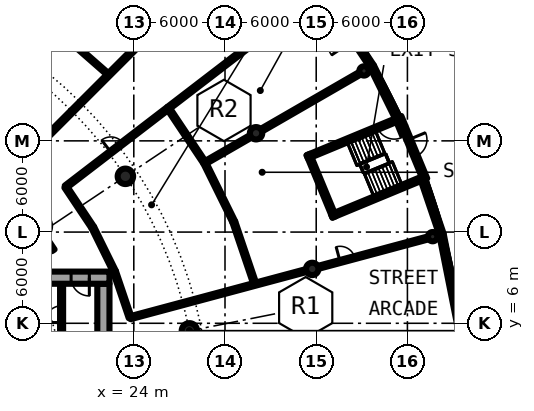
"""IFC4 building model, lengths in metres.
Left out: names, types, materials, properties, quantities, classifications, styles, units other than length and angle.
Written with IfcOpenShell. Run it as: python <this file> out.ifc"""

import sys

from ifc_helpers import new_model, si_unit, direction, frame, frame_2d, origin, origin_2d, place, context, subcontext, project, spatial, rectangle, hollow_circle, extrude, element, fill, save


model = new_model("IFC4")
c1 = context("Model", 3, precision=1e-05, world=origin(), true_north=direction((0.0, 1.0)))
c2 = subcontext(c1, "Body", "Model", "MODEL_VIEW")
j1 = project(units=[si_unit("LENGTHUNIT", "METRE"), si_unit("PLANEANGLEUNIT", "RADIAN")], contexts=[c1])
p1 = place(None, origin())
s1 = spatial("IfcSite", under=j1, at=p1, CompositionType="ELEMENT")
p2 = place(p1, origin())
s2 = spatial("IfcBuilding", under=s1, at=p2, CompositionType="ELEMENT")
p3 = place(p2, origin())
s3 = spatial("IfcBuildingStorey", under=s2, at=p3, CompositionType="ELEMENT", Elevation=0.0)
for number, where, z_axis, x_axis in (
    (1, (27.658, 5.501, -0.5), (0.0, 0.0, 1.0), (1.0, 0.0, 0.0)),
    (2, (23.448, 15.667, -0.5), (0.0, 0.0, 1.0), (1.0, 0.0, 0.0)),
):
    element("IfcColumn", number, at=place(p3, frame(where, z_axis=z_axis, x_axis=x_axis)), inside=s3, PredefinedType="COLUMN", context=c2, shape_type="SweptSolid", body=[
        extrude(hollow_circle(Radius=0.508, WallThickness=0.05, at=origin_2d()), origin(), (0.0, 0.0, 1.0), 5.9),
    ])
for number, where, z_axis, x_axis in (
    (3, (35.739, 9.576, -0.5), (0.0, 0.0, 1.0), (1.0, 0.0, 0.0)),
    (4, (32.043, 18.5, -0.5), (0.0, 0.0, 1.0), (1.0, 0.0, 0.0)),
):
    element("IfcColumn", number, at=place(p3, frame(where, z_axis=z_axis, x_axis=x_axis)), inside=s3, PredefinedType="COLUMN", context=c2, shape_type="SweptSolid", body=[
        extrude(hollow_circle(Radius=0.406, WallThickness=0.03, at=origin_2d()), origin(), (0.0, 0.0, 1.0), 5.9),
    ])
for number, where, z_axis, x_axis in (
    (5, (43.66, 11.698, -0.5), (0.0, 0.0, 1.0), (1.0, 0.0, 0.0)),
    (6, (39.144, 22.6, -0.5), (0.0, 0.0, 1.0), (1.0, 0.0, 0.0)),
):
    element("IfcColumn", number, at=place(p3, frame(where, z_axis=z_axis, x_axis=x_axis)), inside=s3, PredefinedType="COLUMN", context=c2, shape_type="SweptSolid", body=[
        extrude(hollow_circle(Radius=0.305, WallThickness=0.025, at=origin_2d()), origin(), (0.0, 0.0, 1.0), 5.9),
    ])
p4 = place(p3, frame((45.408, 5.978, 0.0), z_axis=(0.0, 0.0, 1.0), x_axis=(-0.195112945602, 0.980780780021, 0.0)))
e7 = element("IfcWall", 7, at=p4, inside=s3, PredefinedType="SOLIDWALL", context=c2, shape_type="SweptSolid", body=[
    extrude(rectangle(XDim=5.991, YDim=0.3, at=frame_2d((2.996, 0.0))), origin(), (0.0, 0.0, 1.0), 4.95),
])
p5 = place(p4, frame((1.396, 0.0, 0.3)))
e8 = element("IfcOpeningElement", 8, at=p5, cuts=e7, PredefinedType="OPENING", context=c2, shape_type="SweptSolid", body=[
    extrude(rectangle(XDim=3.2, YDim=3.6, at=frame_2d((1.6, 1.8))), frame((0.0, 0.16, 0.0), z_axis=(0.0, -1.0, 0.0), x_axis=(1.0, 0.0, 0.0)), (0.0, 0.0, 1.0), 0.32),
])
p6 = place(p3, frame((44.239, 11.854, 0.0), z_axis=(0.0, 0.0, 1.0), x_axis=(-0.321481387979, 0.946915897629, 0.0)))
e9 = element("IfcWall", 9, at=p6, inside=s3, PredefinedType="SOLIDWALL", context=c2, shape_type="SweptSolid", body=[
    extrude(rectangle(XDim=3.761, YDim=0.3, at=frame_2d((1.88, 0.0))), origin(), (0.0, 0.0, 1.0), 4.95),
])
p7 = place(p3, frame((41.327, 19.527, 0.0), z_axis=(0.0, 0.0, 1.0), x_axis=(-0.44219447383, 0.896919197762, 0.0)))
e10 = element("IfcWall", 10, at=p7, inside=s3, PredefinedType="SOLIDWALL", context=c2, shape_type="SweptSolid", body=[
    extrude(rectangle(XDim=3.76, YDim=0.3, at=frame_2d((1.88, 0.0))), origin(), (0.0, 0.0, 1.0), 4.95),
])
p8 = place(p3, frame((39.664, 22.9, 0.0), z_axis=(0.0, 0.0, 1.0), x_axis=(-0.55554631985, 0.831485590074, 0.0)))
e11 = element("IfcWall", 11, at=p8, inside=s3, PredefinedType="SOLIDWALL", context=c2, shape_type="SweptSolid", body=[
    extrude(rectangle(XDim=5.991, YDim=0.3, at=frame_2d((2.995, 0.0))), origin(), (0.0, 0.0, 1.0), 4.95),
])
p9 = place(p8, frame((2.095, 0.0, 0.0)))
e12 = element("IfcOpeningElement", 12, at=p9, cuts=e11, PredefinedType="OPENING", context=c2, shape_type="SweptSolid", body=[
    extrude(rectangle(XDim=1.8, YDim=2.2, at=frame_2d((0.9, 1.1))), frame((0.0, 0.16, 0.0), z_axis=(0.0, -1.0, 0.0), x_axis=(1.0, 0.0, 0.0)), (0.0, 0.0, 1.0), 0.32),
])
p10 = place(p3, frame((22.0, 8.6, 0.0), z_axis=(0.0, 0.0, 1.0), x_axis=(0.0, -1.0, 0.0)))
e13 = element("IfcWall", 13, at=p10, inside=s3, PredefinedType="SHEAR", context=c2, shape_type="SweptSolid", body=[
    extrude(rectangle(XDim=17.2, YDim=0.8, at=frame_2d((8.6, 0.0))), origin(), (0.0, 0.0, 1.0), 5.4),
])
p11 = place(p10, frame((7.7, 0.0, 0.0)))
e14 = element("IfcOpeningElement", 14, at=p11, cuts=e13, PredefinedType="OPENING", context=c2, shape_type="SweptSolid", body=[
    extrude(rectangle(XDim=1.8, YDim=2.3, at=frame_2d((0.9, 1.15))), frame((0.0, 0.41, 0.0), z_axis=(0.0, -1.0, 0.0), x_axis=(1.0, 0.0, 0.0)), (0.0, 0.0, 1.0), 0.82),
])
p12 = place(p3, frame((19.25, 1.575, 0.0), z_axis=(0.0, 0.0, 1.0), x_axis=(0.0, 1.0, 0.0)))
e15 = element("IfcWall", 15, at=p12, inside=s3, PredefinedType="SOLIDWALL", context=c2, shape_type="SweptSolid", body=[
    extrude(rectangle(XDim=7.025, YDim=0.2, at=frame_2d((3.513, 0.0))), origin(), (0.0, 0.0, 1.0), 4.95),
])
p13 = place(p12, frame((4.475, 0.0, 0.0)))
e16 = element("IfcOpeningElement", 16, at=p13, cuts=e15, PredefinedType="OPENING", context=c2, shape_type="SweptSolid", body=[
    extrude(rectangle(XDim=1.1, YDim=2.3, at=frame_2d((0.55, 1.15))), frame((0.0, 0.11, 0.0), z_axis=(0.0, -1.0, 0.0), x_axis=(1.0, 0.0, 0.0)), (0.0, 0.0, 1.0), 0.22),
])
p14 = place(p3, frame((22.4, 9.0, 0.0), z_axis=(0.0, 0.0, 1.0), x_axis=(-1.0, 0.0, 0.0)))
e17 = element("IfcWall", 17, at=p14, inside=s3, PredefinedType="SHEAR", context=c2, shape_type="SweptSolid", body=[
    extrude(rectangle(XDim=5.4, YDim=0.8, at=frame_2d((2.7, 0.0))), origin(), (0.0, 0.0, 1.0), 5.4),
])
p15 = place(p14, frame((1.325, 0.0, 0.0)))
e18 = element("IfcOpeningElement", 18, at=p15, cuts=e17, PredefinedType="OPENING", context=c2, shape_type="SweptSolid", body=[
    extrude(rectangle(XDim=1.2, YDim=2.3, at=frame_2d((0.6, 1.15))), frame((0.0, 0.41, 0.0), z_axis=(0.0, -1.0, 0.0), x_axis=(1.0, 0.0, 0.0)), (0.0, 0.0, 1.0), 0.82),
])
p16 = place(p3, frame((41.372, 19.41, 0.0), z_axis=(0.0, 0.0, 1.0), x_axis=(-0.923886743203, -0.382666023753, 0.0)))
e19 = element("IfcWall", 19, at=p16, inside=s3, PredefinedType="SHEAR", context=c2, shape_type="SweptSolid", body=[
    extrude(rectangle(XDim=6.45, YDim=0.25, at=frame_2d((3.225, 0.0))), origin(), (0.0, 0.0, 1.0), 5.4),
])
p17 = place(p16, frame((0.25, 0.0, 0.0)))
e20 = element("IfcOpeningElement", 20, at=p17, cuts=e19, PredefinedType="OPENING", context=c2, shape_type="SweptSolid", body=[
    extrude(rectangle(XDim=1.2, YDim=2.3, at=frame_2d((0.6, 1.15))), frame((0.0, 0.135, 0.0), z_axis=(0.0, -1.0, 0.0), x_axis=(1.0, 0.0, 0.0)), (0.0, 0.0, 1.0), 0.27),
])
p18 = place(p3, frame((37.02, 13.061, 0.0), z_axis=(0.0, 0.0, 1.0), x_axis=(0.923881200375, 0.38267940576, 0.0)))
e21 = element("IfcWall", 21, at=p18, inside=s3, PredefinedType="SHEAR", context=c2, shape_type="SweptSolid", body=[
    extrude(rectangle(XDim=6.45, YDim=0.25, at=frame_2d((3.225, 0.0))), origin(), (0.0, 0.0, 1.0), 5.4),
])
p19 = place(p3, frame((37.183, 12.993, 0.0), z_axis=(0.0, 0.0, 1.0), x_axis=(-0.382713570591, 0.923867048273, 0.0)))
e22 = element("IfcWall", 22, at=p19, inside=s3, PredefinedType="SHEAR", context=c2, shape_type="SweptSolid", body=[
    extrude(rectangle(XDim=4.45, YDim=0.25, at=frame_2d((2.225, 0.0))), origin(), (0.0, 0.0, 1.0), 5.4),
])
p20 = place(p3, frame((41.462, 19.583, 0.0), z_axis=(0.0, 0.0, 1.0), x_axis=(0.382666743194, -0.923886445216, 0.0)))
e23 = element("IfcWall", 23, at=p20, inside=s3, PredefinedType="SHEAR", context=c2, shape_type="SweptSolid", body=[
    extrude(rectangle(XDim=4.45, YDim=0.3, at=frame_2d((2.225, 0.0))), origin(), (0.0, 0.0, 1.0), 5.4),
])
p21 = place(p20, frame((1.625, 0.0, 0.0)))
e24 = element("IfcOpeningElement", 24, at=p21, cuts=e23, PredefinedType="OPENING", context=c2, shape_type="SweptSolid", body=[
    extrude(rectangle(XDim=1.2, YDim=2.3, at=frame_2d((0.6, 1.15))), frame((0.0, 0.16, 0.0), z_axis=(0.0, -1.0, 0.0), x_axis=(1.0, 0.0, 0.0)), (0.0, 0.0, 1.0), 0.32),
])
p22 = place(p3, frame((17.395, 17.395, 0.0), z_axis=(0.0, 0.0, 1.0), x_axis=(0.707106781187, 0.707106781187, 0.0)))
e25 = element("IfcWall", 25, at=p22, inside=s3, PredefinedType="PARTITIONING", context=c2, shape_type="SweptSolid", body=[
    extrude(rectangle(XDim=11.994, YDim=0.2, at=frame_2d((5.997, 0.0))), origin(), (0.0, 0.0, 1.0), 4.95),
])
p23 = place(p3, frame((19.516, 14.976, 0.0), z_axis=(0.0, 0.0, 1.0), x_axis=(0.793407068843, 0.608691402198, 0.0)))
e26 = element("IfcWall", 26, at=p23, inside=s3, PredefinedType="PARTITIONING", context=c2, shape_type="SweptSolid", body=[
    extrude(rectangle(XDim=8.5, YDim=0.2, at=frame_2d((4.25, 0.0))), origin(), (0.0, 0.0, 1.0), 4.95),
])
p24 = place(p23, frame((3.75, 0.0, 0.0)))
e27 = element("IfcOpeningElement", 27, at=p24, cuts=e26, PredefinedType="OPENING", context=c2, shape_type="SweptSolid", body=[
    extrude(rectangle(XDim=1.0, YDim=2.3, at=frame_2d((0.5, 1.15))), frame((0.0, 0.11, 0.0), z_axis=(0.0, -1.0, 0.0), x_axis=(1.0, 0.0, 0.0)), (0.0, 0.0, 1.0), 0.22),
])
p25 = place(p3, frame((23.763, 6.365, 0.0), z_axis=(0.0, 0.0, 1.0), x_axis=(0.965943238878, 0.258754051689, 0.0)))
e28 = element("IfcWall", 28, at=p25, inside=s3, PredefinedType="PARTITIONING", context=c2, shape_type="SweptSolid", body=[
    extrude(rectangle(XDim=12.0, YDim=0.2, at=frame_2d((6.0, 0.0))), origin(), (0.0, 0.0, 1.0), 4.95),
])
p26 = place(p3, frame((26.26, 20.15, 0.0), z_axis=(0.0, 0.0, 1.0), x_axis=(0.793363129336, 0.608748671465, 0.0)))
e29 = element("IfcWall", 29, at=p26, inside=s3, PredefinedType="PARTITIONING", context=c2, shape_type="SweptSolid", body=[
    extrude(rectangle(XDim=12.588, YDim=0.2, at=frame_2d((6.294, 0.0))), origin(), (0.0, 0.0, 1.0), 4.95),
])
p27 = place(p26, frame((5.794, 0.0, 0.0)))
e30 = element("IfcOpeningElement", 30, at=p27, cuts=e29, PredefinedType="OPENING", context=c2, shape_type="SweptSolid", body=[
    extrude(rectangle(XDim=1.0, YDim=2.3, at=frame_2d((0.5, 1.15))), frame((0.0, 0.11, 0.0), z_axis=(0.0, -1.0, 0.0), x_axis=(1.0, 0.0, 0.0)), (0.0, 0.0, 1.0), 0.22),
])
p28 = place(p3, frame((28.665, 16.55, 0.0), z_axis=(0.0, 0.0, 1.0), x_axis=(0.86608920467, 0.499889477339, 0.0)))
e31 = element("IfcWall", 31, at=p28, inside=s3, PredefinedType="PARTITIONING", context=c2, shape_type="SweptSolid", body=[
    extrude(rectangle(XDim=3.501, YDim=0.2, at=frame_2d((1.75, 0.0))), origin(), (0.0, 0.0, 1.0), 4.95),
])
p29 = place(p3, frame((32.389, 18.7, 0.0), z_axis=(0.0, 0.0, 1.0), x_axis=(0.866055506462, 0.499947857008, 0.0)))
e32 = element("IfcWall", 32, at=p29, inside=s3, PredefinedType="PARTITIONING", context=c2, shape_type="SweptSolid", body=[
    extrude(rectangle(XDim=7.501, YDim=0.2, at=frame_2d((3.75, 0.0))), origin(), (0.0, 0.0, 1.0), 4.95),
])
p30 = place(p3, frame((36.126, 9.677, 0.0), z_axis=(0.0, 0.0, 1.0), x_axis=(0.96593933493, 0.258768624905, 0.0)))
e33 = element("IfcWall", 33, at=p30, inside=s3, PredefinedType="PARTITIONING", context=c2, shape_type="SweptSolid", body=[
    extrude(rectangle(XDim=7.5, YDim=0.2, at=frame_2d((3.75, 0.0))), origin(), (0.0, 0.0, 1.0), 4.95),
])
p31 = place(p30, frame((1.494, 0.0, 0.0)))
e34 = element("IfcOpeningElement", 34, at=p31, cuts=e33, PredefinedType="OPENING", context=c2, shape_type="SweptSolid", body=[
    extrude(rectangle(XDim=1.0, YDim=2.3, at=frame_2d((0.5, 1.15))), frame((0.0, 0.11, 0.0), z_axis=(0.0, -1.0, 0.0), x_axis=(1.0, 0.0, 0.0)), (0.0, 0.0, 1.0), 0.22),
])
p32 = place(p3, frame((17.136, 13.149, 0.0), z_axis=(0.0, 0.0, 1.0), x_axis=(0.55571678686, -0.831371669473, 0.0)))
e35 = element("IfcWall", 35, at=p32, inside=s3, PredefinedType="PARTITIONING", context=c2, shape_type="SweptSolid", body=[
    extrude(rectangle(XDim=2.825, YDim=0.2, at=frame_2d((1.413, 0.0))), origin(), (0.0, 0.0, 1.0), 4.95),
])
p33 = place(p32, frame((0.913, 0.0, 0.0)))
e36 = element("IfcOpeningElement", 36, at=p33, cuts=e35, PredefinedType="OPENING", context=c2, shape_type="SweptSolid", body=[
    extrude(rectangle(XDim=1.0, YDim=2.3, at=frame_2d((0.5, 1.15))), frame((0.0, 0.11, 0.0), z_axis=(0.0, -1.0, 0.0), x_axis=(1.0, 0.0, 0.0)), (0.0, 0.0, 1.0), 0.22),
])
p34 = place(p3, frame((19.516, 14.976, 0.0), z_axis=(0.0, 0.0, 1.0), x_axis=(0.555522714148, -0.831501361433, 0.0)))
e37 = element("IfcWall", 37, at=p34, inside=s3, PredefinedType="PARTITIONING", context=c2, shape_type="SweptSolid", body=[
    extrude(rectangle(XDim=3.218, YDim=0.2, at=frame_2d((1.609, 0.0))), origin(), (0.0, 0.0, 1.0), 4.95),
])
p35 = place(p3, frame((21.304, 12.3, 0.0), z_axis=(0.0, 0.0, 1.0), x_axis=(0.442259878763, -0.896886949195, 0.0)))
e38 = element("IfcWall", 38, at=p35, inside=s3, PredefinedType="PARTITIONING", context=c2, shape_type="SweptSolid", body=[
    extrude(rectangle(XDim=3.218, YDim=0.2, at=frame_2d((1.609, 0.0))), origin(), (0.0, 0.0, 1.0), 4.95),
])
p36 = place(p3, frame((22.727, 9.414, 0.0), z_axis=(0.0, 0.0, 1.0), x_axis=(0.321593976879, -0.946877665823, 0.0)))
e39 = element("IfcWall", 39, at=p36, inside=s3, PredefinedType="PARTITIONING", context=c2, shape_type="SweptSolid", body=[
    extrude(rectangle(XDim=3.218, YDim=0.2, at=frame_2d((1.609, 0.0))), origin(), (0.0, 0.0, 1.0), 4.95),
])
p37 = place(p3, frame((19.237, 25.07, 0.0), z_axis=(0.0, 0.0, 1.0), x_axis=(0.751895740099, -0.659282030713, 0.0)))
e40 = element("IfcWall", 40, at=p37, inside=s3, PredefinedType="PARTITIONING", context=c2, shape_type="SweptSolid", body=[
    extrude(rectangle(XDim=4.134, YDim=0.15, at=frame_2d((2.067, 0.0))), origin(), (0.0, 0.0, 1.0), 4.95),
])
p38 = place(p3, frame((26.26, 20.15, 0.0), z_axis=(0.0, 0.0, 1.0), x_axis=(0.555519783102, -0.831503319646, 0.0)))
e41 = element("IfcWall", 41, at=p38, inside=s3, PredefinedType="PARTITIONING", context=c2, shape_type="SweptSolid", body=[
    extrude(rectangle(XDim=4.329, YDim=0.2, at=frame_2d((2.165, 0.0))), origin(), (0.0, 0.0, 1.0), 4.95),
])
p39 = place(p3, frame((28.665, 16.55, 0.0), z_axis=(0.0, 0.0, 1.0), x_axis=(0.442312366853, -0.89686106512, 0.0)))
e42 = element("IfcWall", 42, at=p39, inside=s3, PredefinedType="PARTITIONING", context=c2, shape_type="SweptSolid", body=[
    extrude(rectangle(XDim=4.33, YDim=0.2, at=frame_2d((2.165, 0.0))), origin(), (0.0, 0.0, 1.0), 4.95),
])
p40 = place(p3, frame((30.58, 12.667, 0.0), z_axis=(0.0, 0.0, 1.0), x_axis=(0.3214498388, -0.946926608104, 0.0)))
e43 = element("IfcWall", 43, at=p40, inside=s3, PredefinedType="PARTITIONING", context=c2, shape_type="SweptSolid", body=[
    extrude(rectangle(XDim=4.33, YDim=0.2, at=frame_2d((2.165, 0.0))), origin(), (0.0, 0.0, 1.0), 4.95),
])
p41 = place(p5, origin())
e44 = element("IfcWindow", 44, at=p41, inside=s3, PartitioningType="SINGLE_PANEL", PredefinedType="WINDOW", context=c2, shape_type="SweptSolid", body=[
    extrude(rectangle(XDim=3.2, YDim=3.6, at=frame_2d((1.6, 1.8))), frame((0.0, 0.03, 0.0), z_axis=(0.0, -1.0, 0.0), x_axis=(1.0, 0.0, 0.0)), (0.0, 0.0, 1.0), 0.06),
])
fill(e8, e44)
p42 = place(p13, origin())
e45 = element("IfcDoor", 45, at=p42, inside=s3, OperationType="SINGLE_SWING_LEFT", PredefinedType="DOOR", context=c2, shape_type="SweptSolid", body=[
    extrude(rectangle(XDim=1.1, YDim=2.3, at=frame_2d((0.55, 1.15))), frame((0.0, 0.025, 0.0), z_axis=(0.0, -1.0, 0.0), x_axis=(1.0, 0.0, 0.0)), (0.0, 0.0, 1.0), 0.05),
])
fill(e16, e45)
p43 = place(p15, origin())
e46 = element("IfcDoor", 46, at=p43, inside=s3, OperationType="SINGLE_SWING_RIGHT", PredefinedType="DOOR", context=c2, shape_type="SweptSolid", body=[
    extrude(rectangle(XDim=1.2, YDim=2.3, at=frame_2d((0.6, 1.15))), frame((0.0, 0.025, 0.0), z_axis=(0.0, -1.0, 0.0), x_axis=(1.0, 0.0, 0.0)), (0.0, 0.0, 1.0), 0.05),
])
fill(e18, e46)
p44 = place(p17, origin())
e47 = element("IfcDoor", 47, at=p44, inside=s3, OperationType="SINGLE_SWING_RIGHT", PredefinedType="DOOR", context=c2, shape_type="SweptSolid", body=[
    extrude(rectangle(XDim=1.2, YDim=2.3, at=frame_2d((0.6, 1.15))), frame((0.0, 0.025, 0.0), z_axis=(0.0, -1.0, 0.0), x_axis=(1.0, 0.0, 0.0)), (0.0, 0.0, 1.0), 0.05),
])
fill(e20, e47)
p45 = place(p21, origin())
e48 = element("IfcDoor", 48, at=p45, inside=s3, OperationType="SINGLE_SWING_LEFT", PredefinedType="DOOR", context=c2, shape_type="SweptSolid", body=[
    extrude(rectangle(XDim=1.2, YDim=2.3, at=frame_2d((0.6, 1.15))), frame((0.0, 0.025, 0.0), z_axis=(0.0, -1.0, 0.0), x_axis=(1.0, 0.0, 0.0)), (0.0, 0.0, 1.0), 0.05),
])
fill(e24, e48)
p46 = place(p24, origin())
e49 = element("IfcDoor", 49, at=p46, inside=s3, OperationType="SINGLE_SWING_RIGHT", PredefinedType="DOOR", context=c2, shape_type="SweptSolid", body=[
    extrude(rectangle(XDim=1.0, YDim=2.3, at=frame_2d((0.5, 1.15))), frame((0.0, 0.025, 0.0), z_axis=(0.0, -1.0, 0.0), x_axis=(1.0, 0.0, 0.0)), (0.0, 0.0, 1.0), 0.05),
])
fill(e27, e49)
p47 = place(p31, origin())
e50 = element("IfcDoor", 50, at=p47, inside=s3, OperationType="SINGLE_SWING_LEFT", PredefinedType="DOOR", context=c2, shape_type="SweptSolid", body=[
    extrude(rectangle(XDim=1.0, YDim=2.3, at=frame_2d((0.5, 1.15))), frame((0.0, 0.025, 0.0), z_axis=(0.0, -1.0, 0.0), x_axis=(1.0, 0.0, 0.0)), (0.0, 0.0, 1.0), 0.05),
])
fill(e34, e50)
p48 = place(p27, origin())
e51 = element("IfcDoor", 51, at=p48, inside=s3, OperationType="SINGLE_SWING_RIGHT", PredefinedType="DOOR", context=c2, shape_type="SweptSolid", body=[
    extrude(rectangle(XDim=1.0, YDim=2.3, at=frame_2d((0.5, 1.15))), frame((0.0, 0.025, 0.0), z_axis=(0.0, -1.0, 0.0), x_axis=(1.0, 0.0, 0.0)), (0.0, 0.0, 1.0), 0.05),
])
fill(e30, e51)
save(model, sys.argv[1])
